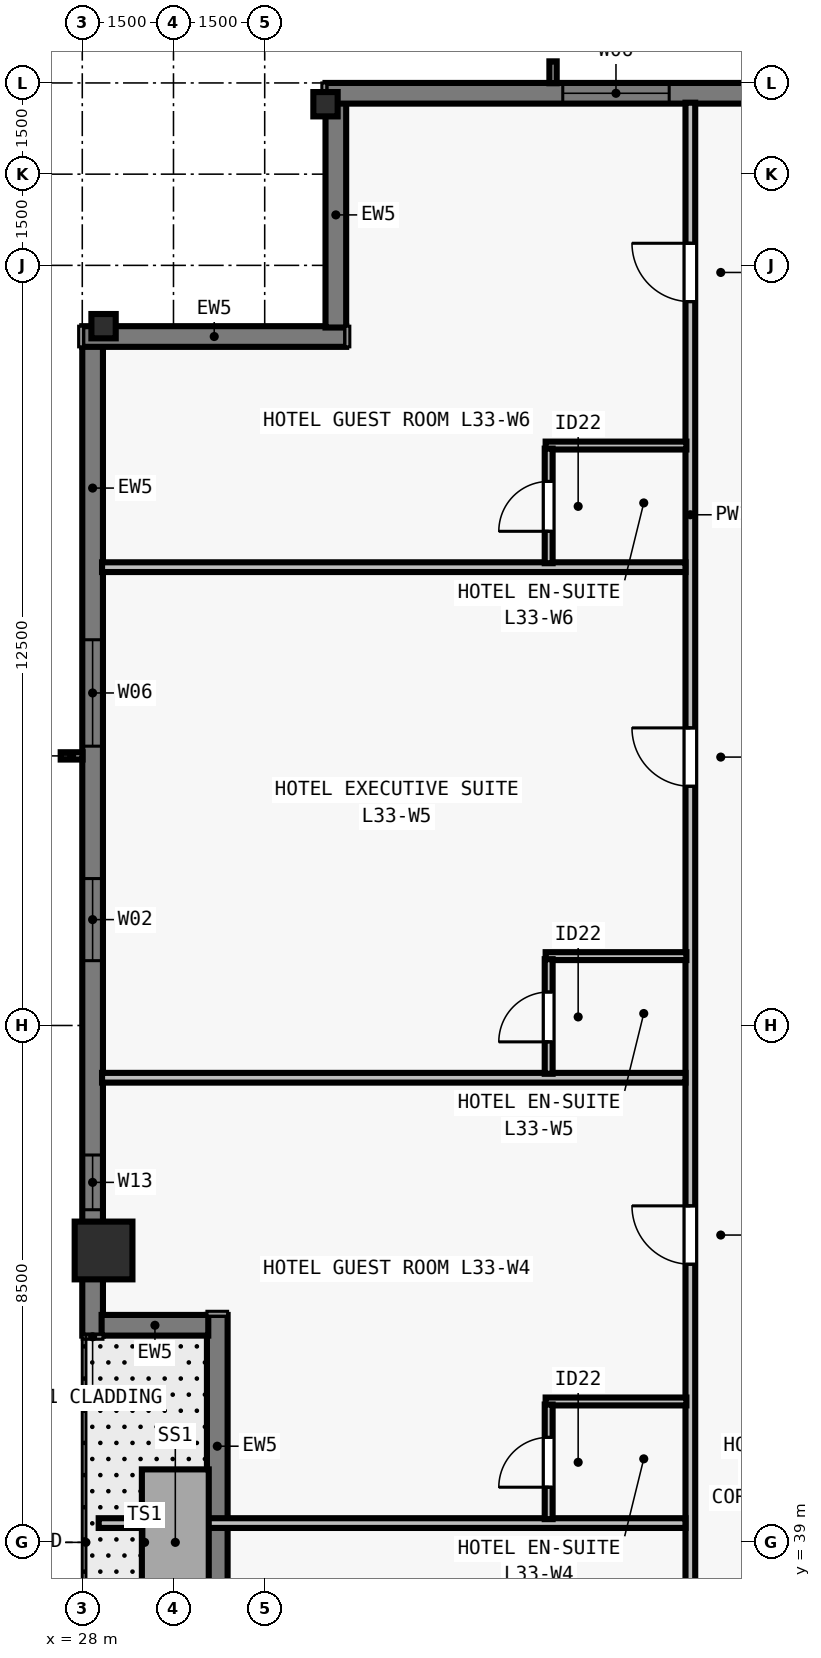
"""IFC4 building model, lengths in metres.
Left out: names, types, materials, properties, quantities, classifications, styles, units other than length and angle.
Written with IfcOpenShell. Run it as: python <this file> out.ifc"""

import sys

from ifc_helpers import new_model, si_unit, direction, frame, frame_2d, origin, origin_2d, place, context, subcontext, project, spatial, rectangle, i_section, extrude, element, fill, save


model = new_model("IFC4")
c1 = context("Model", 3, precision=1e-05, world=origin(), true_north=direction((0.0, 1.0)))
c2 = subcontext(c1, "Body", "Model", "MODEL_VIEW")
j1 = project(units=[si_unit("LENGTHUNIT", "METRE"), si_unit("PLANEANGLEUNIT", "RADIAN")], contexts=[c1])
p1 = place(None, origin())
s1 = spatial("IfcSite", under=j1, at=p1, CompositionType="ELEMENT")
p2 = place(p1, origin())
s2 = spatial("IfcBuilding", under=s1, at=p2, CompositionType="ELEMENT")
p3 = place(p2, frame((0.0, 0.0, 123.5)))
s3 = spatial("IfcBuildingStorey", under=s2, at=p3, CompositionType="ELEMENT", Elevation=123.5)
for number, where, z_axis, x_axis in (
    (1, (32.0, 62.65, 0.0), (0.0, 0.0, 1.0), (1.0, 0.0, 0.0)),
    (2, (28.35, 59.0, 0.0), (0.0, 0.0, 1.0), (0.0, 1.0, 0.0)),
):
    element("IfcColumn", number, at=place(p3, frame(where, z_axis=z_axis, x_axis=x_axis)), inside=s3, PredefinedType="COLUMN", context=c2, shape_type="SweptSolid", body=[
        extrude(i_section(OverallWidth=0.4, OverallDepth=0.4, WebThickness=0.022, FlangeThickness=0.036, at=origin_2d()), origin(), (0.0, 0.0, 1.0), 3.5),
    ])
p4 = place(p3, frame((28.35, 43.8, 0.0), z_axis=(0.0, 0.0, 1.0), x_axis=(0.0, 1.0, 0.0)))
e3 = element("IfcColumn", 3, at=p4, inside=s3, PredefinedType="COLUMN", context=c2, shape_type="SweptSolid", body=[
    extrude(rectangle(XDim=0.95, YDim=0.95, at=origin_2d()), origin(), (0.0, 0.0, 1.0), 3.5),
])
p5 = place(p3, frame((28.17, 42.4, 0.0), z_axis=(0.0, 0.0, 1.0), x_axis=(0.0, 1.0, 0.0)))
e4 = element("IfcWall", 4, at=p5, inside=s3, PredefinedType="SOLIDWALL", context=c2, shape_type="SweptSolid", body=[
    extrude(rectangle(XDim=16.282, YDim=0.34, at=frame_2d((8.141, 0.0))), origin(), (0.0, 0.0, 1.0), 3.28),
])
p6 = place(p5, frame((6.166, 0.0, 0.8)))
e5 = element("IfcOpeningElement", 5, at=p6, cuts=e4, PredefinedType="OPENING", context=c2, shape_type="SweptSolid", body=[
    extrude(rectangle(XDim=1.35, YDim=1.66, at=frame_2d((0.675, 0.83))), frame((0.0, 0.18, 0.0), z_axis=(0.0, -1.0, 0.0), x_axis=(1.0, 0.0, 0.0)), (0.0, 0.0, 1.0), 0.36),
])
p7 = place(p5, frame((9.693, 0.0, 0.8)))
e6 = element("IfcOpeningElement", 6, at=p7, cuts=e4, PredefinedType="OPENING", context=c2, shape_type="SweptSolid", body=[
    extrude(rectangle(XDim=1.75, YDim=1.66, at=frame_2d((0.875, 0.83))), frame((0.0, 0.18, 0.0), z_axis=(0.0, -1.0, 0.0), x_axis=(1.0, 0.0, 0.0)), (0.0, 0.0, 1.0), 0.36),
])
p8 = place(p5, frame((2.07, 0.0, 0.8)))
e7 = element("IfcOpeningElement", 7, at=p8, cuts=e4, PredefinedType="OPENING", context=c2, shape_type="SweptSolid", body=[
    extrude(rectangle(XDim=0.9, YDim=1.66, at=frame_2d((0.45, 0.83))), frame((0.0, 0.18, 0.0), z_axis=(0.0, -1.0, 0.0), x_axis=(1.0, 0.0, 0.0)), (0.0, 0.0, 1.0), 0.36),
])
p9 = place(p3, frame((28.0, 58.83, 0.0), z_axis=(0.0, 0.0, 1.0), x_axis=(1.0, 0.0, 0.0)))
e8 = element("IfcWall", 8, at=p9, inside=s3, PredefinedType="SOLIDWALL", context=c2, shape_type="SweptSolid", body=[
    extrude(rectangle(XDim=4.34, YDim=0.34, at=frame_2d((2.17, 0.0))), origin(), (0.0, 0.0, 1.0), 3.28),
])
p10 = place(p3, frame((32.17, 58.978, 0.0), z_axis=(0.0, 0.0, 1.0), x_axis=(0.0, 1.0, 0.0)))
e9 = element("IfcWall", 9, at=p10, inside=s3, PredefinedType="SOLIDWALL", context=c2, shape_type="SweptSolid", body=[
    extrude(rectangle(XDim=3.704, YDim=0.34, at=frame_2d((1.852, 0.0))), origin(), (0.0, 0.0, 1.0), 3.28),
])
p11 = place(p3, frame((32.0, 62.83, 0.0), z_axis=(0.0, 0.0, 1.0), x_axis=(1.0, 0.0, 0.0)))
e10 = element("IfcWall", 10, at=p11, inside=s3, PredefinedType="SOLIDWALL", context=c2, shape_type="SweptSolid", body=[
    extrude(rectangle(XDim=39.682, YDim=0.34, at=frame_2d((19.841, 0.0))), origin(), (0.0, 0.0, 1.0), 3.28),
])
p12 = place(p11, frame((3.902, 0.0, 0.8)))
e11 = element("IfcOpeningElement", 11, at=p12, cuts=e10, PredefinedType="OPENING", context=c2, shape_type="SweptSolid", body=[
    extrude(rectangle(XDim=1.75, YDim=1.66, at=frame_2d((0.875, 0.83))), frame((0.0, 0.18, 0.0), z_axis=(0.0, -1.0, 0.0), x_axis=(1.0, 0.0, 0.0)), (0.0, 0.0, 1.0), 0.36),
])
p13 = place(p11, frame((8.505, 0.0, 0.8)))
e12 = element("IfcOpeningElement", 12, at=p13, cuts=e10, PredefinedType="OPENING", context=c2, shape_type="SweptSolid", body=[
    extrude(rectangle(XDim=1.35, YDim=1.66, at=frame_2d((0.675, 0.83))), frame((0.0, 0.18, 0.0), z_axis=(0.0, -1.0, 0.0), x_axis=(1.0, 0.0, 0.0)), (0.0, 0.0, 1.0), 0.36),
])
p14 = place(p11, frame((11.859, 0.0, 0.8)))
e13 = element("IfcOpeningElement", 13, at=p14, cuts=e10, PredefinedType="OPENING", context=c2, shape_type="SweptSolid", body=[
    extrude(rectangle(XDim=1.75, YDim=1.66, at=frame_2d((0.875, 0.83))), frame((0.0, 0.18, 0.0), z_axis=(0.0, -1.0, 0.0), x_axis=(1.0, 0.0, 0.0)), (0.0, 0.0, 1.0), 0.36),
])
p15 = place(p11, frame((16.062, 0.0, 0.8)))
e14 = element("IfcOpeningElement", 14, at=p15, cuts=e10, PredefinedType="OPENING", context=c2, shape_type="SweptSolid", body=[
    extrude(rectangle(XDim=1.35, YDim=1.66, at=frame_2d((0.675, 0.83))), frame((0.0, 0.18, 0.0), z_axis=(0.0, -1.0, 0.0), x_axis=(1.0, 0.0, 0.0)), (0.0, 0.0, 1.0), 0.36),
])
p16 = place(p11, frame((17.716, 0.0, 0.8)))
e15 = element("IfcOpeningElement", 15, at=p16, cuts=e10, PredefinedType="OPENING", context=c2, shape_type="SweptSolid", body=[
    extrude(rectangle(XDim=1.75, YDim=1.66, at=frame_2d((0.875, 0.83))), frame((0.0, 0.18, 0.0), z_axis=(0.0, -1.0, 0.0), x_axis=(1.0, 0.0, 0.0)), (0.0, 0.0, 1.0), 0.36),
])
p17 = place(p11, frame((22.719, 0.0, 0.8)))
e16 = element("IfcOpeningElement", 16, at=p17, cuts=e10, PredefinedType="OPENING", context=c2, shape_type="SweptSolid", body=[
    extrude(rectangle(XDim=1.35, YDim=1.66, at=frame_2d((0.675, 0.83))), frame((0.0, 0.18, 0.0), z_axis=(0.0, -1.0, 0.0), x_axis=(1.0, 0.0, 0.0)), (0.0, 0.0, 1.0), 0.36),
])
p18 = place(p11, frame((26.073, 0.0, 0.8)))
e17 = element("IfcOpeningElement", 17, at=p18, cuts=e10, PredefinedType="OPENING", context=c2, shape_type="SweptSolid", body=[
    extrude(rectangle(XDim=1.75, YDim=1.66, at=frame_2d((0.875, 0.83))), frame((0.0, 0.18, 0.0), z_axis=(0.0, -1.0, 0.0), x_axis=(1.0, 0.0, 0.0)), (0.0, 0.0, 1.0), 0.36),
])
p19 = place(p11, frame((30.677, 0.0, 0.8)))
e18 = element("IfcOpeningElement", 18, at=p19, cuts=e10, PredefinedType="OPENING", context=c2, shape_type="SweptSolid", body=[
    extrude(rectangle(XDim=1.35, YDim=1.66, at=frame_2d((0.675, 0.83))), frame((0.0, 0.18, 0.0), z_axis=(0.0, -1.0, 0.0), x_axis=(1.0, 0.0, 0.0)), (0.0, 0.0, 1.0), 0.36),
])
p20 = place(p11, frame((33.18, 0.0, 0.8)))
e19 = element("IfcOpeningElement", 19, at=p20, cuts=e10, PredefinedType="OPENING", context=c2, shape_type="SweptSolid", body=[
    extrude(rectangle(XDim=1.75, YDim=1.66, at=frame_2d((0.875, 0.83))), frame((0.0, 0.18, 0.0), z_axis=(0.0, -1.0, 0.0), x_axis=(1.0, 0.0, 0.0)), (0.0, 0.0, 1.0), 0.36),
])
p21 = place(p3, frame((30.22, 35.578, 0.0), z_axis=(0.0, 0.0, 1.0), x_axis=(0.0, 1.0, 0.0)))
e20 = element("IfcWall", 20, at=p21, inside=s3, PredefinedType="SOLIDWALL", context=c2, shape_type="SweptSolid", body=[
    extrude(rectangle(XDim=7.162, YDim=0.34, at=frame_2d((3.581, 0.0))), origin(), (0.0, 0.0, 1.0), 3.28),
])
p22 = place(p21, frame((1.694, 0.0, 0.0)))
e21 = element("IfcOpeningElement", 21, at=p22, cuts=e20, PredefinedType="OPENING", context=c2, shape_type="SweptSolid", body=[
    extrude(rectangle(XDim=1.0, YDim=2.15, at=frame_2d((0.5, 1.075))), frame((0.0, 0.18, 0.0), z_axis=(0.0, -1.0, 0.0), x_axis=(1.0, 0.0, 0.0)), (0.0, 0.0, 1.0), 0.36),
])
p23 = place(p3, frame((30.072, 42.57, 0.0), z_axis=(0.0, 0.0, 1.0), x_axis=(-1.0, 0.0, 0.0)))
e22 = element("IfcWall", 22, at=p23, inside=s3, PredefinedType="SOLIDWALL", context=c2, shape_type="SweptSolid", body=[
    extrude(rectangle(XDim=1.754, YDim=0.34, at=frame_2d((0.877, 0.0))), origin(), (0.0, 0.0, 1.0), 3.28),
])
p24 = place(p3, frame((38.0, 15.325, 0.0), z_axis=(0.0, 0.0, 1.0), x_axis=(0.0, 1.0, 0.0)))
e23 = element("IfcWall", 23, at=p24, inside=s3, PredefinedType="PARTITIONING", context=c2, shape_type="SweptSolid", body=[
    extrude(rectangle(XDim=47.35, YDim=0.16, at=frame_2d((23.675, 0.0))), origin(), (0.0, 0.0, 1.0), 2.555),
])
p25 = place(p24, frame((5.003, 0.0, 0.0)))
e24 = element("IfcOpeningElement", 24, at=p25, cuts=e23, PredefinedType="OPENING", context=c2, shape_type="SweptSolid", body=[
    extrude(rectangle(XDim=0.96, YDim=2.15, at=frame_2d((0.48, 1.075))), frame((0.0, 0.09, 0.0), z_axis=(0.0, -1.0, 0.0), x_axis=(1.0, 0.0, 0.0)), (0.0, 0.0, 1.0), 0.18),
])
p26 = place(p24, frame((12.529, 0.0, 0.0)))
e25 = element("IfcOpeningElement", 25, at=p26, cuts=e23, PredefinedType="OPENING", context=c2, shape_type="SweptSolid", body=[
    extrude(rectangle(XDim=0.96, YDim=2.15, at=frame_2d((0.48, 1.075))), frame((0.0, 0.09, 0.0), z_axis=(0.0, -1.0, 0.0), x_axis=(1.0, 0.0, 0.0)), (0.0, 0.0, 1.0), 0.18),
])
p27 = place(p24, frame((20.389, 0.0, 0.0)))
e26 = element("IfcOpeningElement", 26, at=p27, cuts=e23, PredefinedType="OPENING", context=c2, shape_type="SweptSolid", body=[
    extrude(rectangle(XDim=0.96, YDim=2.15, at=frame_2d((0.48, 1.075))), frame((0.0, 0.09, 0.0), z_axis=(0.0, -1.0, 0.0), x_axis=(1.0, 0.0, 0.0)), (0.0, 0.0, 1.0), 0.18),
])
p28 = place(p24, frame((28.249, 0.0, 0.0)))
e27 = element("IfcOpeningElement", 27, at=p28, cuts=e23, PredefinedType="OPENING", context=c2, shape_type="SweptSolid", body=[
    extrude(rectangle(XDim=0.96, YDim=2.15, at=frame_2d((0.48, 1.075))), frame((0.0, 0.09, 0.0), z_axis=(0.0, -1.0, 0.0), x_axis=(1.0, 0.0, 0.0)), (0.0, 0.0, 1.0), 0.18),
])
p29 = place(p24, frame((36.109, 0.0, 0.0)))
e28 = element("IfcOpeningElement", 28, at=p29, cuts=e23, PredefinedType="OPENING", context=c2, shape_type="SweptSolid", body=[
    extrude(rectangle(XDim=0.96, YDim=2.15, at=frame_2d((0.48, 1.075))), frame((0.0, 0.09, 0.0), z_axis=(0.0, -1.0, 0.0), x_axis=(1.0, 0.0, 0.0)), (0.0, 0.0, 1.0), 0.18),
])
p30 = place(p24, frame((44.079, 0.0, 0.0)))
e29 = element("IfcOpeningElement", 29, at=p30, cuts=e23, PredefinedType="OPENING", context=c2, shape_type="SweptSolid", body=[
    extrude(rectangle(XDim=0.96, YDim=2.15, at=frame_2d((0.48, 1.075))), frame((0.0, 0.09, 0.0), z_axis=(0.0, -1.0, 0.0), x_axis=(1.0, 0.0, 0.0)), (0.0, 0.0, 1.0), 0.18),
])
p31 = place(p3, frame((28.27, 39.317, 0.0), z_axis=(0.0, 0.0, 1.0), x_axis=(1.0, 0.0, 0.0)))
e30 = element("IfcWall", 30, at=p31, inside=s3, PredefinedType="PARTITIONING", context=c2, shape_type="SweptSolid", body=[
    extrude(rectangle(XDim=9.65, YDim=0.16, at=frame_2d((4.825, 0.0))), origin(), (0.0, 0.0, 1.0), 2.896),
])
p32 = place(p3, frame((35.62, 41.317, 0.0), z_axis=(0.0, 0.0, 1.0), x_axis=(1.0, 0.0, 0.0)))
e31 = element("IfcWall", 31, at=p32, inside=s3, PredefinedType="PLUMBINGWALL", context=c2, shape_type="SweptSolid", body=[
    extrude(rectangle(XDim=2.315, YDim=0.13, at=frame_2d((1.157, 0.0))), origin(), (0.0, 0.0, 1.0), 2.896),
])
p33 = place(p3, frame((35.67, 39.382, 0.0), z_axis=(0.0, 0.0, 1.0), x_axis=(0.0, 1.0, 0.0)))
e32 = element("IfcWall", 32, at=p33, inside=s3, PredefinedType="PLUMBINGWALL", context=c2, shape_type="SweptSolid", body=[
    extrude(rectangle(XDim=1.885, YDim=0.13, at=frame_2d((0.942, 0.0))), origin(), (0.0, 0.0, 1.0), 3.28),
])
p34 = place(p33, frame((0.525, 0.0, 0.0)))
e33 = element("IfcOpeningElement", 33, at=p34, cuts=e32, PredefinedType="OPENING", context=c2, shape_type="SweptSolid", body=[
    extrude(rectangle(XDim=0.82, YDim=2.1, at=frame_2d((0.41, 1.05))), frame((0.0, 0.075, 0.0), z_axis=(0.0, -1.0, 0.0), x_axis=(1.0, 0.0, 0.0)), (0.0, 0.0, 1.0), 0.15),
])
p35 = place(p3, frame((28.325, 46.641, 0.0), z_axis=(0.0, 0.0, 1.0), x_axis=(1.0, 0.0, 0.0)))
e34 = element("IfcWall", 34, at=p35, inside=s3, PredefinedType="PARTITIONING", context=c2, shape_type="SweptSolid", body=[
    extrude(rectangle(XDim=9.595, YDim=0.16, at=frame_2d((4.797, 0.0))), origin(), (0.0, 0.0, 1.0), 3.28),
])
p36 = place(p3, frame((35.62, 48.641, 0.0), z_axis=(0.0, 0.0, 1.0), x_axis=(1.0, 0.0, 0.0)))
e35 = element("IfcWall", 35, at=p36, inside=s3, PredefinedType="PLUMBINGWALL", context=c2, shape_type="SweptSolid", body=[
    extrude(rectangle(XDim=2.315, YDim=0.13, at=frame_2d((1.157, 0.0))), origin(), (0.0, 0.0, 1.0), 3.28),
])
p37 = place(p3, frame((35.67, 46.706, 0.0), z_axis=(0.0, 0.0, 1.0), x_axis=(0.0, 1.0, 0.0)))
e36 = element("IfcWall", 36, at=p37, inside=s3, PredefinedType="PLUMBINGWALL", context=c2, shape_type="SweptSolid", body=[
    extrude(rectangle(XDim=1.885, YDim=0.13, at=frame_2d((0.942, 0.0))), origin(), (0.0, 0.0, 1.0), 3.28),
])
p38 = place(p37, frame((0.525, 0.0, 0.0)))
e37 = element("IfcOpeningElement", 37, at=p38, cuts=e36, PredefinedType="OPENING", context=c2, shape_type="SweptSolid", body=[
    extrude(rectangle(XDim=0.82, YDim=2.1, at=frame_2d((0.41, 1.05))), frame((0.0, 0.075, 0.0), z_axis=(0.0, -1.0, 0.0), x_axis=(1.0, 0.0, 0.0)), (0.0, 0.0, 1.0), 0.15),
])
p39 = place(p3, frame((28.325, 55.037, 0.0), z_axis=(0.0, 0.0, 1.0), x_axis=(1.0, 0.0, 0.0)))
e38 = element("IfcWall", 38, at=p39, inside=s3, PredefinedType="PARTITIONING", context=c2, shape_type="SweptSolid", body=[
    extrude(rectangle(XDim=9.595, YDim=0.16, at=frame_2d((4.797, 0.0))), origin(), (0.0, 0.0, 1.0), 2.896),
])
p40 = place(p3, frame((35.62, 57.037, 0.0), z_axis=(0.0, 0.0, 1.0), x_axis=(1.0, 0.0, 0.0)))
e39 = element("IfcWall", 39, at=p40, inside=s3, PredefinedType="PLUMBINGWALL", context=c2, shape_type="SweptSolid", body=[
    extrude(rectangle(XDim=2.315, YDim=0.13, at=frame_2d((1.157, 0.0))), origin(), (0.0, 0.0, 1.0), 3.28),
])
p41 = place(p3, frame((35.67, 55.102, 0.0), z_axis=(0.0, 0.0, 1.0), x_axis=(0.0, 1.0, 0.0)))
e40 = element("IfcWall", 40, at=p41, inside=s3, PredefinedType="PLUMBINGWALL", context=c2, shape_type="SweptSolid", body=[
    extrude(rectangle(XDim=1.885, YDim=0.13, at=frame_2d((0.942, 0.0))), origin(), (0.0, 0.0, 1.0), 3.28),
])
p42 = place(p41, frame((0.525, 0.0, 0.0)))
e41 = element("IfcOpeningElement", 41, at=p42, cuts=e40, PredefinedType="OPENING", context=c2, shape_type="SweptSolid", body=[
    extrude(rectangle(XDim=0.82, YDim=2.1, at=frame_2d((0.41, 1.05))), frame((0.0, 0.075, 0.0), z_axis=(0.0, -1.0, 0.0), x_axis=(1.0, 0.0, 0.0)), (0.0, 0.0, 1.0), 0.15),
])
p43 = place(p6, origin())
e42 = element("IfcWindow", 42, at=p43, inside=s3, PartitioningType="SINGLE_PANEL", PredefinedType="WINDOW", context=c2, shape_type="SweptSolid", body=[
    extrude(rectangle(XDim=1.35, YDim=1.66, at=frame_2d((0.675, 0.83))), frame((0.0, -0.05, 0.0), z_axis=(0.0, -1.0, 0.0), x_axis=(1.0, 0.0, 0.0)), (0.0, 0.0, 1.0), 0.06),
])
fill(e5, e42)
p44 = place(p7, origin())
e43 = element("IfcWindow", 43, at=p44, inside=s3, PartitioningType="SINGLE_PANEL", PredefinedType="WINDOW", context=c2, shape_type="SweptSolid", body=[
    extrude(rectangle(XDim=1.75, YDim=1.66, at=frame_2d((0.875, 0.83))), frame((0.0, -0.05, 0.0), z_axis=(0.0, -1.0, 0.0), x_axis=(1.0, 0.0, 0.0)), (0.0, 0.0, 1.0), 0.06),
])
fill(e6, e43)
p45 = place(p12, origin())
e44 = element("IfcWindow", 44, at=p45, inside=s3, PartitioningType="SINGLE_PANEL", PredefinedType="WINDOW", context=c2, shape_type="SweptSolid", body=[
    extrude(rectangle(XDim=1.75, YDim=1.66, at=frame_2d((0.875, 0.83))), frame((0.0, -0.05, 0.0), z_axis=(0.0, -1.0, 0.0), x_axis=(1.0, 0.0, 0.0)), (0.0, 0.0, 1.0), 0.06),
])
fill(e11, e44)
p46 = place(p8, origin())
e45 = element("IfcWindow", 45, at=p46, inside=s3, PartitioningType="SINGLE_PANEL", PredefinedType="WINDOW", context=c2, shape_type="SweptSolid", body=[
    extrude(rectangle(XDim=0.9, YDim=1.66, at=frame_2d((0.45, 0.83))), frame((0.0, -0.04, 0.0), z_axis=(0.0, -1.0, 0.0), x_axis=(1.0, 0.0, 0.0)), (0.0, 0.0, 1.0), 0.06),
])
fill(e7, e45)
p47 = place(p34, origin())
e46 = element("IfcDoor", 46, at=p47, inside=s3, OperationType="SINGLE_SWING_LEFT", PredefinedType="DOOR", context=c2, shape_type="SweptSolid", body=[
    extrude(rectangle(XDim=0.82, YDim=2.1, at=frame_2d((0.41, 1.05))), frame((0.0, 0.025, 0.0), z_axis=(0.0, -1.0, 0.0), x_axis=(1.0, 0.0, 0.0)), (0.0, 0.0, 1.0), 0.05),
])
fill(e33, e46)
p48 = place(p28, origin())
e47 = element("IfcDoor", 47, at=p48, inside=s3, OperationType="SINGLE_SWING_RIGHT", PredefinedType="DOOR", context=c2, shape_type="SweptSolid", body=[
    extrude(rectangle(XDim=0.96, YDim=2.15, at=frame_2d((0.48, 1.075))), frame((0.0, 0.025, 0.0), z_axis=(0.0, -1.0, 0.0), x_axis=(1.0, 0.0, 0.0)), (0.0, 0.0, 1.0), 0.05),
])
fill(e27, e47)
p49 = place(p38, origin())
e48 = element("IfcDoor", 48, at=p49, inside=s3, OperationType="SINGLE_SWING_LEFT", PredefinedType="DOOR", context=c2, shape_type="SweptSolid", body=[
    extrude(rectangle(XDim=0.82, YDim=2.1, at=frame_2d((0.41, 1.05))), frame((0.0, 0.025, 0.0), z_axis=(0.0, -1.0, 0.0), x_axis=(1.0, 0.0, 0.0)), (0.0, 0.0, 1.0), 0.05),
])
fill(e37, e48)
p50 = place(p29, origin())
e49 = element("IfcDoor", 49, at=p50, inside=s3, OperationType="SINGLE_SWING_RIGHT", PredefinedType="DOOR", context=c2, shape_type="SweptSolid", body=[
    extrude(rectangle(XDim=0.96, YDim=2.15, at=frame_2d((0.48, 1.075))), frame((0.0, 0.025, 0.0), z_axis=(0.0, -1.0, 0.0), x_axis=(1.0, 0.0, 0.0)), (0.0, 0.0, 1.0), 0.05),
])
fill(e28, e49)
p51 = place(p42, origin())
e50 = element("IfcDoor", 50, at=p51, inside=s3, OperationType="SINGLE_SWING_LEFT", PredefinedType="DOOR", context=c2, shape_type="SweptSolid", body=[
    extrude(rectangle(XDim=0.82, YDim=2.1, at=frame_2d((0.41, 1.05))), frame((0.0, 0.025, 0.0), z_axis=(0.0, -1.0, 0.0), x_axis=(1.0, 0.0, 0.0)), (0.0, 0.0, 1.0), 0.05),
])
fill(e41, e50)
p52 = place(p30, origin())
e51 = element("IfcDoor", 51, at=p52, inside=s3, OperationType="SINGLE_SWING_RIGHT", PredefinedType="DOOR", context=c2, shape_type="SweptSolid", body=[
    extrude(rectangle(XDim=0.96, YDim=2.15, at=frame_2d((0.48, 1.075))), frame((0.0, 0.025, 0.0), z_axis=(0.0, -1.0, 0.0), x_axis=(1.0, 0.0, 0.0)), (0.0, 0.0, 1.0), 0.05),
])
fill(e29, e51)
save(model, sys.argv[1])
